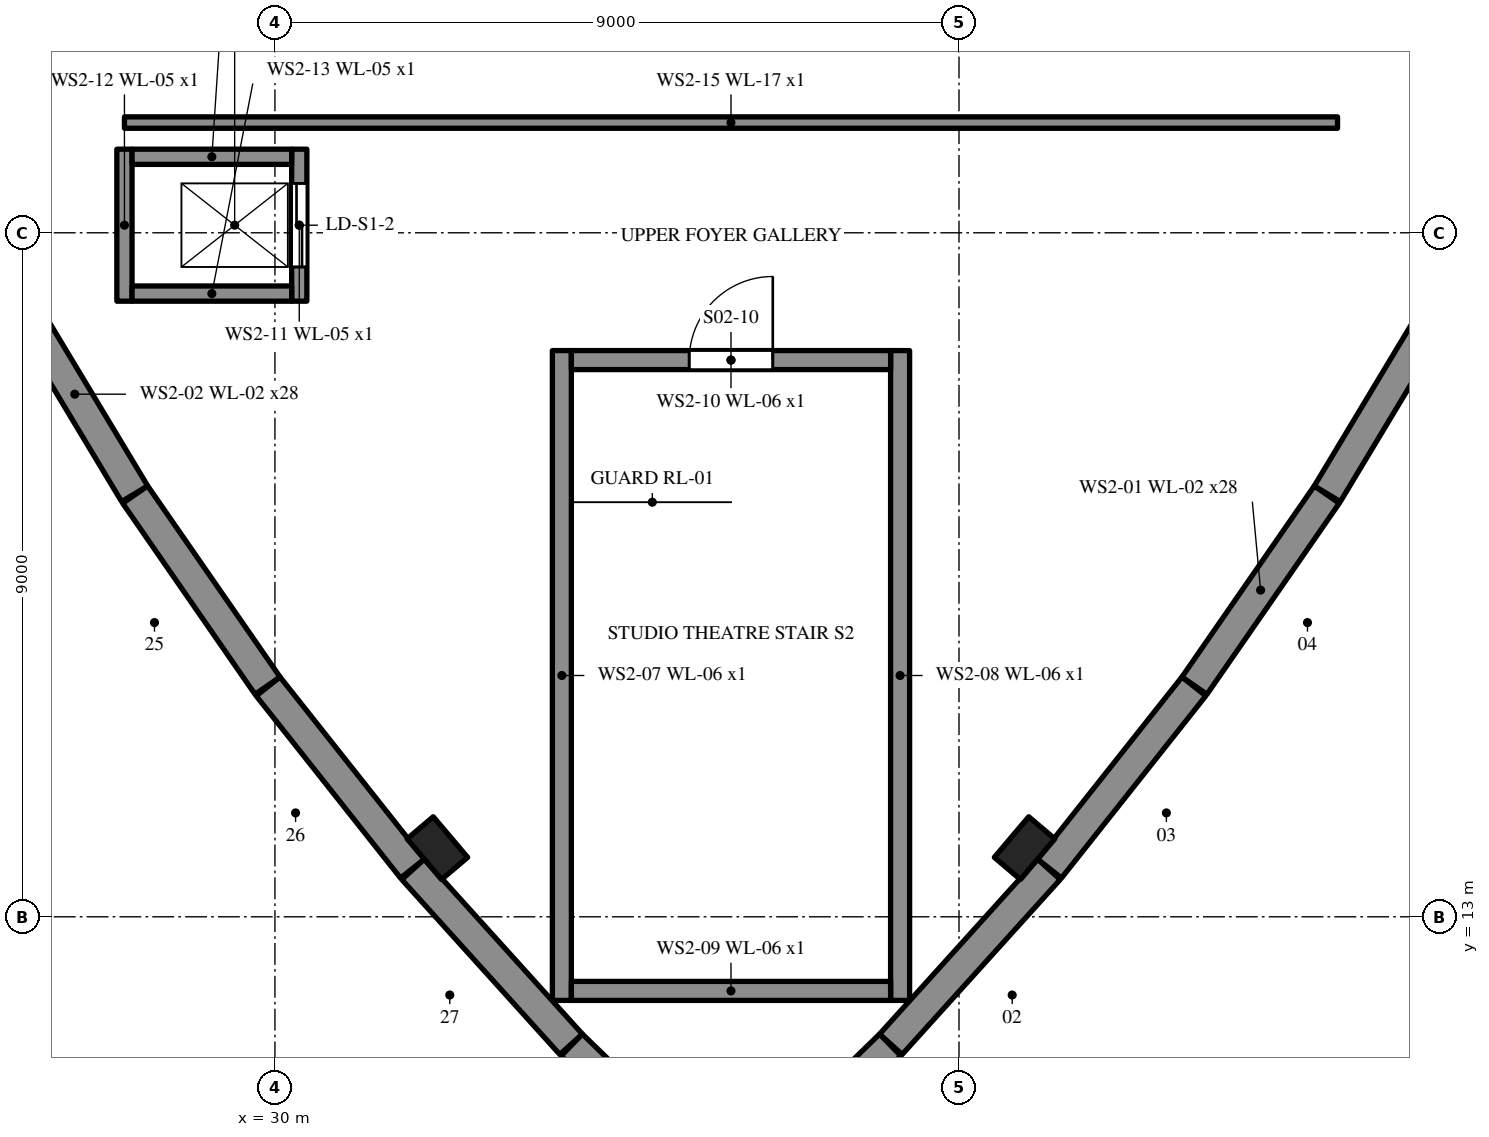
"""IFC4 building model, lengths in metres.
Left out: names, types, materials, properties, quantities, classifications, styles, units other than length and angle.
Written with IfcOpenShell. Run it as: python <this file> out.ifc"""

import sys

from ifc_helpers import new_model, si_unit, direction, frame, frame_2d, origin, origin_2d, place, context, subcontext, project, spatial, polyline, rectangle, outline, extrude, element, fill, save


model = new_model("IFC4")
c1 = context("Model", 3, precision=1e-05, world=origin(), true_north=direction((0.0, 1.0)))
c2 = subcontext(c1, "Body", "Model", "MODEL_VIEW")
j1 = project(units=[si_unit("LENGTHUNIT", "METRE"), si_unit("PLANEANGLEUNIT", "RADIAN")], contexts=[c1])
p1 = place(None, origin())
s1 = spatial("IfcSite", under=j1, at=p1, CompositionType="ELEMENT")
p2 = place(p1, origin())
s2 = spatial("IfcBuilding", under=s1, at=p2, CompositionType="ELEMENT")
p3 = place(p2, frame((0.0, 0.0, 10.2)))
s3 = spatial("IfcBuildingStorey", under=s2, at=p3, CompositionType="ELEMENT", Elevation=10.2)
p4 = place(p3, frame((36.139, 9.414, 0.0), z_axis=(0.0, 0.0, 1.0), x_axis=(0.717243568607, 0.696822547922, 0.0)))
e1 = element("IfcWall", 1, at=p4, inside=s3, PredefinedType="SOLIDWALL", context=c2, shape_type="SweptSolid", body=[
    extrude(outline(polyline([(0.0, 0.0), (2.726, 0.0), (2.726, 2.641), (0.131, 1.843), (0.0, 1.803), (0.0, 0.0)])), frame((0.0, 0.2, 0.0), z_axis=(0.0, -1.0, 0.0), x_axis=(1.0, 0.0, 0.0)), (0.0, 0.0, 1.0), 0.4),
])
p5 = place(p3, frame((38.104, 11.323, 0.0), z_axis=(0.0, 0.0, 1.0), x_axis=(0.67038553216, 0.742012963681, 0.0)))
e2 = element("IfcWall", 2, at=p5, inside=s3, PredefinedType="SOLIDWALL", context=c2, shape_type="SweptSolid", body=[
    extrude(outline(polyline([(0.0, 0.0), (3.102, 0.0), (3.102, 3.546), (2.92, 3.494), (2.739, 3.441), (0.0, 2.65), (0.0, 0.0)])), frame((0.0, 0.2, 0.0), z_axis=(0.0, -1.0, 0.0), x_axis=(1.0, 0.0, 0.0)), (0.0, 0.0, 1.0), 0.4),
])
p6 = place(p3, frame((40.191, 13.634, 0.0), z_axis=(0.0, 0.0, 1.0), x_axis=(0.620958553355, 0.783843399548, 0.0)))
e3 = element("IfcWall", 3, at=p6, inside=s3, PredefinedType="SOLIDWALL", context=c2, shape_type="SweptSolid", body=[
    extrude(outline(polyline([(0.0, 0.0), (3.058, 0.0), (3.058, 2.844), (2.719, 2.944), (0.33, 3.644), (0.172, 3.69), (0.0, 3.557), (0.0, 0.0)])), frame((0.0, 0.2, 0.0), z_axis=(0.0, -1.0, 0.0), x_axis=(1.0, 0.0, 0.0)), (0.0, 0.0, 1.0), 0.4),
])
p7 = place(p3, frame((42.098, 16.042, 0.0), z_axis=(0.0, 0.0, 1.0), x_axis=(0.569371892655, 0.822080073871, 0.0)))
e4 = element("IfcWall", 4, at=p7, inside=s3, PredefinedType="SOLIDWALL", context=c2, shape_type="SweptSolid", body=[
    extrude(outline(polyline([(0.0, 0.0), (3.058, 0.0), (3.058, 1.968), (2.596, 2.103), (0.293, 2.769), (0.0, 2.838), (0.0, 0.0)])), frame((0.0, 0.2, 0.0), z_axis=(0.0, -1.0, 0.0), x_axis=(1.0, 0.0, 0.0)), (0.0, 0.0, 1.0), 0.4),
])
p8 = place(p3, frame((43.846, 18.566, 0.0), z_axis=(0.0, 0.0, 1.0), x_axis=(0.515387841983, 0.856957042293, 0.0)))
e5 = element("IfcWall", 5, at=p8, inside=s3, PredefinedType="SOLIDWALL", context=c2, shape_type="SweptSolid", body=[
    extrude(outline(polyline([(0.0, 0.0), (3.058, 0.0), (3.058, 2.843), (3.011, 2.83), (0.0, 1.964), (0.0, 0.0)])), frame((0.0, 0.2, 0.0), z_axis=(0.0, -1.0, 0.0), x_axis=(1.0, 0.0, 0.0)), (0.0, 0.0, 1.0), 0.4),
])
p9 = place(p3, frame((26.578, 21.186, 0.0), z_axis=(0.0, 0.0, 1.0), x_axis=(0.515387841983, -0.856957042293, 0.0)))
e6 = element("IfcWall", 6, at=p9, inside=s3, PredefinedType="SOLIDWALL", context=c2, shape_type="SweptSolid", body=[
    extrude(outline(polyline([(0.0, 0.0), (3.058, 0.0), (3.058, 1.958), (3.047, 1.95), (0.047, 2.83), (0.0, 2.843), (0.0, 0.0)])), frame((0.0, 0.2, 0.0), z_axis=(0.0, -1.0, 0.0), x_axis=(1.0, 0.0, 0.0)), (0.0, 0.0, 1.0), 0.4),
])
p10 = place(p3, frame((28.161, 18.555, 0.0), z_axis=(0.0, 0.0, 1.0), x_axis=(0.569371892655, -0.822080073871, 0.0)))
e7 = element("IfcWall", 7, at=p10, inside=s3, PredefinedType="SOLIDWALL", context=c2, shape_type="SweptSolid", body=[
    extrude(outline(polyline([(0.0, 0.0), (3.058, 0.0), (3.058, 2.838), (2.765, 2.769), (0.462, 2.103), (0.0, 1.968), (0.0, 0.0)])), frame((0.0, 0.2, 0.0), z_axis=(0.0, -1.0, 0.0), x_axis=(1.0, 0.0, 0.0)), (0.0, 0.0, 1.0), 0.4),
])
p11 = place(p3, frame((29.91, 16.031, 0.0), z_axis=(0.0, 0.0, 1.0), x_axis=(0.620958553355, -0.783843399548, 0.0)))
e8 = element("IfcWall", 8, at=p11, inside=s3, PredefinedType="SOLIDWALL", context=c2, shape_type="SweptSolid", body=[
    extrude(outline(polyline([(0.0, 0.0), (3.058, 0.0), (3.058, 3.555), (3.044, 3.56), (2.886, 3.69), (2.727, 3.644), (0.339, 2.944), (0.0, 2.844), (0.0, 0.0)])), frame((0.0, 0.2, 0.0), z_axis=(0.0, -1.0, 0.0), x_axis=(1.0, 0.0, 0.0)), (0.0, 0.0, 1.0), 0.4),
])
p12 = place(p3, frame((31.817, 13.625, 0.0), z_axis=(0.0, 0.0, 1.0), x_axis=(0.67038553216, -0.742012963681, 0.0)))
e9 = element("IfcWall", 9, at=p12, inside=s3, PredefinedType="SOLIDWALL", context=c2, shape_type="SweptSolid", body=[
    extrude(outline(polyline([(0.0, 0.0), (3.102, 0.0), (3.102, 2.65), (3.088, 2.654), (0.363, 3.441), (0.182, 3.494), (0.0, 3.546), (0.0, 0.0)])), frame((0.0, 0.2, 0.0), z_axis=(0.0, -1.0, 0.0), x_axis=(1.0, 0.0, 0.0)), (0.0, 0.0, 1.0), 0.4),
])
p13 = place(p3, frame((33.906, 11.314, 0.0), z_axis=(0.0, 0.0, 1.0), x_axis=(0.717243568607, -0.696822547922, 0.0)))
e10 = element("IfcWall", 10, at=p13, inside=s3, PredefinedType="SOLIDWALL", context=c2, shape_type="SweptSolid", body=[
    extrude(outline(polyline([(0.0, 0.0), (2.726, 0.0), (2.726, 1.803), (2.595, 1.843), (0.0, 2.643), (0.0, 0.0)])), frame((0.0, 0.2, 0.0), z_axis=(0.0, -1.0, 0.0), x_axis=(1.0, 0.0, 0.0)), (0.0, 0.0, 1.0), 0.4),
])
for number, where, z_axis, x_axis in (
    (11, (39.863, 13.904, 0.0), (0.0, 0.0, 1.0), (0.646, 0.763, 0.0)),
    (12, (32.137, 13.904, 0.0), (0.0, 0.0, 1.0), (0.646, -0.763, 0.0)),
):
    element("IfcColumn", number, at=place(p3, frame(where, z_axis=z_axis, x_axis=x_axis)), inside=s3, PredefinedType="PILASTER", context=c2, shape_type="SweptSolid", body=[
        extrude(rectangle(XDim=0.7, YDim=0.45, at=origin_2d()), origin(), (0.0, 0.0, 1.0), 3.924),
    ])
for number, where, z_axis, x_axis in (
    (13, (33.775, 20.45, 0.0), (0.0, 0.0, 1.0), (0.0, -1.0, 0.0)),
    (14, (38.225, 11.9, 0.0), (0.0, 0.0, 1.0), (0.0, 1.0, 0.0)),
):
    element("IfcWall", number, at=place(p3, frame(where, z_axis=z_axis, x_axis=x_axis)), inside=s3, PredefinedType="SHEAR", context=c2, shape_type="SweptSolid", body=[
        extrude(rectangle(XDim=8.55, YDim=0.25, at=frame_2d((4.275, 0.0))), origin(), (0.0, 0.0, 1.0), 2.4),
    ])
p14 = place(p3, frame((38.1, 12.025, 0.0), z_axis=(0.0, 0.0, 1.0), x_axis=(-1.0, 0.0, 0.0)))
e15 = element("IfcWall", 15, at=p14, inside=s3, PredefinedType="SHEAR", context=c2, shape_type="SweptSolid", body=[
    extrude(rectangle(XDim=4.2, YDim=0.25, at=frame_2d((2.1, 0.0))), origin(), (0.0, 0.0, 1.0), 2.4),
])
p15 = place(p3, frame((33.9, 20.325, 0.0), z_axis=(0.0, 0.0, 1.0), x_axis=(1.0, 0.0, 0.0)))
e16 = element("IfcWall", 16, at=p15, inside=s3, PredefinedType="SHEAR", context=c2, shape_type="SweptSolid", body=[
    extrude(rectangle(XDim=4.2, YDim=0.25, at=frame_2d((2.1, 0.0))), origin(), (0.0, 0.0, 1.0), 2.4),
])
p16 = place(p15, frame((1.55, 0.0, 0.0)))
e17 = element("IfcOpeningElement", 17, at=p16, cuts=e16, PredefinedType="OPENING", context=c2, shape_type="SweptSolid", body=[
    extrude(rectangle(XDim=1.1, YDim=2.1, at=frame_2d((0.55, 1.05))), frame((0.0, 0.135, 0.0), z_axis=(0.0, -1.0, 0.0), x_axis=(1.0, 0.0, 0.0)), (0.0, 0.0, 1.0), 0.27),
])
p17 = place(p3, frame((30.32, 21.1, 0.0), z_axis=(0.0, 0.0, 1.0), x_axis=(0.0, 1.0, 0.0)))
e18 = element("IfcWall", 18, at=p17, inside=s3, PredefinedType="SHEAR", context=c2, shape_type="SweptSolid", body=[
    extrude(rectangle(XDim=2.0, YDim=0.2, at=frame_2d((1.0, 0.0))), origin(), (0.0, 0.0, 1.0), 3.342),
])
p18 = place(p17, frame((0.45, 0.0, 0.0)))
e19 = element("IfcOpeningElement", 19, at=p18, cuts=e18, PredefinedType="OPENING", context=c2, shape_type="SweptSolid", body=[
    extrude(rectangle(XDim=1.1, YDim=2.2, at=frame_2d((0.55, 1.1))), frame((0.0, 0.11, 0.0), z_axis=(0.0, -1.0, 0.0), x_axis=(1.0, 0.0, 0.0)), (0.0, 0.0, 1.0), 0.22),
])
p19 = place(p3, frame((28.02, 23.1, 0.0), z_axis=(0.0, 0.0, 1.0), x_axis=(0.0, -1.0, 0.0)))
e20 = element("IfcWall", 20, at=p19, inside=s3, PredefinedType="SHEAR", context=c2, shape_type="SweptSolid", body=[
    extrude(rectangle(XDim=2.0, YDim=0.2, at=frame_2d((1.0, 0.0))), origin(), (0.0, 0.0, 1.0), 3.342),
])
for number, where, z_axis, x_axis in (
    (21, (28.12, 21.2, 0.0), (0.0, 0.0, 1.0), (1.0, 0.0, 0.0)),
    (22, (30.22, 23.0, 0.0), (0.0, 0.0, 1.0), (-1.0, 0.0, 0.0)),
):
    element("IfcWall", number, at=place(p3, frame(where, z_axis=z_axis, x_axis=x_axis)), inside=s3, PredefinedType="SHEAR", context=c2, shape_type="SweptSolid", body=[
        extrude(rectangle(XDim=2.1, YDim=0.2, at=frame_2d((1.05, 0.0))), origin(), (0.0, 0.0, 1.0), 3.342),
    ])
p20 = place(p3, frame((43.98, 23.45, 0.0), z_axis=(0.0, 0.0, 1.0), x_axis=(-1.0, 0.0, 0.0)))
e23 = element("IfcWall", 23, at=p20, inside=s3, PredefinedType="PARTITIONING", context=c2, shape_type="SweptSolid", body=[
    extrude(rectangle(XDim=15.96, YDim=0.15, at=frame_2d((7.98, 0.0))), origin(), (0.0, 0.0, 1.0), 2.4),
])
p21 = place(p18, origin())
e24 = element("IfcDoor", 24, at=p21, inside=s3, OperationType="SLIDING_TO_LEFT", PredefinedType="DOOR", context=c2, shape_type="SweptSolid", body=[
    extrude(rectangle(XDim=1.1, YDim=2.2, at=frame_2d((0.55, 1.1))), frame((0.0, 0.025, 0.0), z_axis=(0.0, -1.0, 0.0), x_axis=(1.0, 0.0, 0.0)), (0.0, 0.0, 1.0), 0.05),
])
fill(e19, e24)
p22 = place(p16, origin())
e25 = element("IfcDoor", 25, at=p22, inside=s3, OperationType="SINGLE_SWING_RIGHT", PredefinedType="DOOR", context=c2, shape_type="SweptSolid", body=[
    extrude(rectangle(XDim=1.1, YDim=2.1, at=frame_2d((0.55, 1.05))), frame((0.0, 0.025, 0.0), z_axis=(0.0, -1.0, 0.0), x_axis=(1.0, 0.0, 0.0)), (0.0, 0.0, 1.0), 0.05),
])
fill(e17, e25)
save(model, sys.argv[1])
